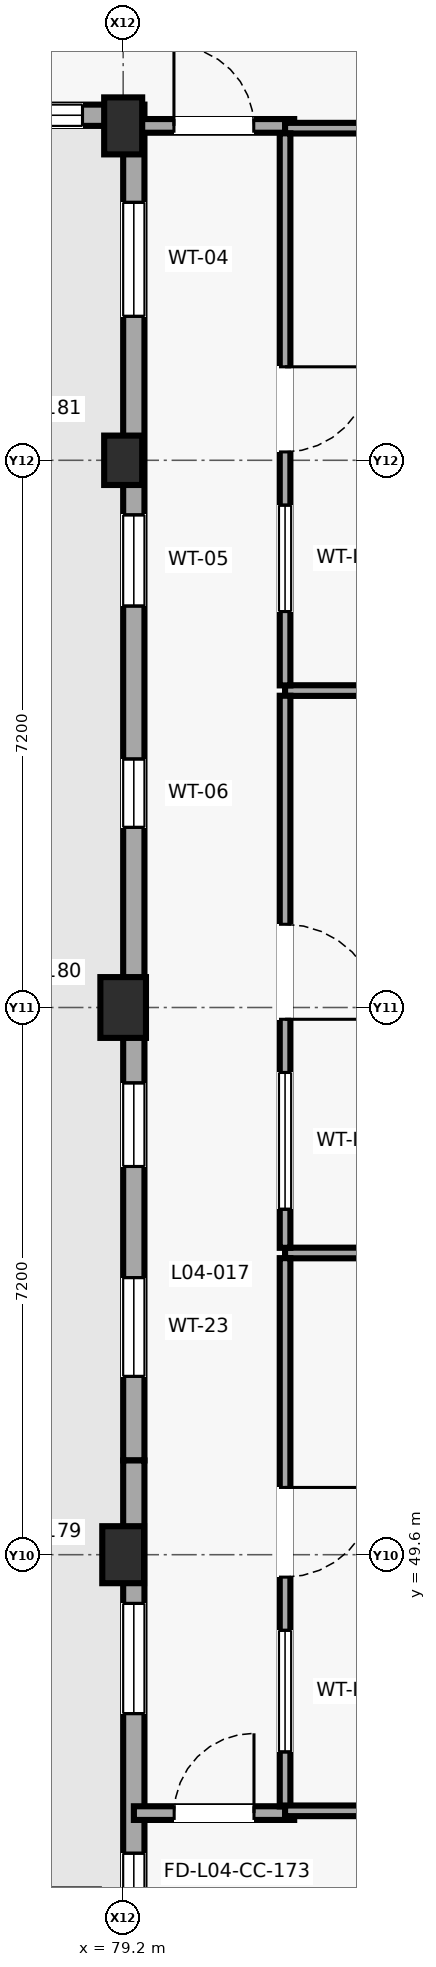
"""IFC4 building model, lengths in metres.
Left out: names, types, materials, properties, quantities, classifications, styles, units other than length and angle.
Written with IfcOpenShell. Run it as: python <this file> out.ifc"""

import sys

from ifc_helpers import new_model, si_unit, direction, frame, frame_2d, origin, origin_2d, place, context, subcontext, project, spatial, rectangle, extrude, element, fill, save


model = new_model("IFC4")
c1 = context("Model", 3, precision=1e-05, world=origin(), true_north=direction((0.0, 1.0)))
c2 = subcontext(c1, "Body", "Model", "MODEL_VIEW")
j1 = project(units=[si_unit("LENGTHUNIT", "METRE"), si_unit("PLANEANGLEUNIT", "RADIAN")], contexts=[c1])
p1 = place(None, origin())
s1 = spatial("IfcSite", under=j1, at=p1, CompositionType="ELEMENT")
p2 = place(p1, origin())
s2 = spatial("IfcBuilding", under=s1, at=p2, CompositionType="ELEMENT")
p3 = place(p2, frame((0.0, 0.0, 16.2)))
s3 = spatial("IfcBuildingStorey", under=s2, at=p3, CompositionType="ELEMENT", Elevation=16.2)
p4 = place(p3, frame((79.2, 49.6, 0.0), z_axis=(0.0, 0.0, 1.0), x_axis=(1.0, 0.0, 0.0)))
e1 = element("IfcColumn", 1, at=p4, inside=s3, PredefinedType="COLUMN", context=c2, shape_type="SweptSolid", body=[
    extrude(rectangle(XDim=0.55, YDim=0.75, at=origin_2d()), origin(), (0.0, 0.0, 1.0), 4.0),
])
p5 = place(p3, frame((79.2, 56.8, 0.0), z_axis=(0.0, 0.0, 1.0), x_axis=(1.0, 0.0, 0.0)))
e2 = element("IfcColumn", 2, at=p5, inside=s3, PredefinedType="COLUMN", context=c2, shape_type="SweptSolid", body=[
    extrude(rectangle(XDim=0.6, YDim=0.8, at=origin_2d()), origin(), (0.0, 0.0, 1.0), 4.0),
])
p6 = place(p3, frame((79.2, 64.0, 0.0), z_axis=(0.0, 0.0, 1.0), x_axis=(1.0, 0.0, 0.0)))
e3 = element("IfcColumn", 3, at=p6, inside=s3, PredefinedType="COLUMN", context=c2, shape_type="SweptSolid", body=[
    extrude(rectangle(XDim=0.5, YDim=0.65, at=origin_2d()), origin(), (0.0, 0.0, 1.0), 4.0),
])
p7 = place(p3, frame((79.2, 68.4, 0.0), z_axis=(0.0, 0.0, 1.0), x_axis=(1.0, 0.0, 0.0)))
e4 = element("IfcColumn", 4, at=p7, inside=s3, PredefinedType="COLUMN", context=c2, shape_type="SweptSolid", body=[
    extrude(rectangle(XDim=0.5, YDim=0.75, at=origin_2d()), origin(), (0.0, 0.0, 1.0), 4.0),
])
p8 = place(p3, frame((67.387, 68.54, 0.0), z_axis=(0.0, 0.0, 1.0), x_axis=(1.0, 0.0, 0.0)))
e5 = element("IfcWall", 5, at=p8, inside=s3, PredefinedType="SOLIDWALL", context=c2, shape_type="SweptSolid", body=[
    extrude(rectangle(XDim=12.093, YDim=0.28, at=frame_2d((6.046, 0.0))), origin(), (0.0, 0.0, 1.0), 3.78),
])
p9 = place(p8, frame((1.116, 0.0, 0.85)))
e6 = element("IfcOpeningElement", 6, at=p9, cuts=e5, PredefinedType="OPENING", context=c2, shape_type="SweptSolid", body=[
    extrude(rectangle(XDim=1.8, YDim=1.8, at=frame_2d((0.9, 0.9))), frame((0.0, 0.15, 0.0), z_axis=(0.0, -1.0, 0.0), x_axis=(1.0, 0.0, 0.0)), (0.0, 0.0, 1.0), 0.3),
])
p10 = place(p8, frame((4.997, 0.0, 0.85)))
e7 = element("IfcOpeningElement", 7, at=p10, cuts=e5, PredefinedType="OPENING", context=c2, shape_type="SweptSolid", body=[
    extrude(rectangle(XDim=2.1, YDim=1.8, at=frame_2d((1.05, 0.9))), frame((0.0, 0.15, 0.0), z_axis=(0.0, -1.0, 0.0), x_axis=(1.0, 0.0, 0.0)), (0.0, 0.0, 1.0), 0.3),
])
p11 = place(p8, frame((8.878, 0.0, 0.85)))
e8 = element("IfcOpeningElement", 8, at=p11, cuts=e5, PredefinedType="OPENING", context=c2, shape_type="SweptSolid", body=[
    extrude(rectangle(XDim=2.4, YDim=1.85, at=frame_2d((1.2, 0.925))), frame((0.0, 0.15, 0.0), z_axis=(0.0, -1.0, 0.0), x_axis=(1.0, 0.0, 0.0)), (0.0, 0.0, 1.0), 0.3),
])
p12 = place(p3, frame((79.34, 68.4, 0.0), z_axis=(0.0, 0.0, 1.0), x_axis=(0.0, -1.0, 0.0)))
e9 = element("IfcWall", 9, at=p12, inside=s3, PredefinedType="SOLIDWALL", context=c2, shape_type="SweptSolid", body=[
    extrude(rectangle(XDim=17.56, YDim=0.28, at=frame_2d((8.78, 0.0))), origin(), (0.0, 0.0, 1.0), 3.175),
])
p13 = place(p12, frame((1.006, 0.0, 0.85)))
e10 = element("IfcOpeningElement", 10, at=p13, cuts=e9, PredefinedType="OPENING", context=c2, shape_type="SweptSolid", body=[
    extrude(rectangle(XDim=1.5, YDim=1.65, at=frame_2d((0.75, 0.825))), frame((0.0, 0.15, 0.0), z_axis=(0.0, -1.0, 0.0), x_axis=(1.0, 0.0, 0.0)), (0.0, 0.0, 1.0), 0.3),
])
p14 = place(p12, frame((5.118, 0.0, 0.85)))
e11 = element("IfcOpeningElement", 11, at=p14, cuts=e9, PredefinedType="OPENING", context=c2, shape_type="SweptSolid", body=[
    extrude(rectangle(XDim=1.2, YDim=1.65, at=frame_2d((0.6, 0.825))), frame((0.0, 0.15, 0.0), z_axis=(0.0, -1.0, 0.0), x_axis=(1.0, 0.0, 0.0)), (0.0, 0.0, 1.0), 0.3),
])
p15 = place(p12, frame((8.33, 0.0, 1.05)))
e12 = element("IfcOpeningElement", 12, at=p15, cuts=e9, PredefinedType="OPENING", context=c2, shape_type="SweptSolid", body=[
    extrude(rectangle(XDim=0.9, YDim=1.5, at=frame_2d((0.45, 0.75))), frame((0.0, 0.15, 0.0), z_axis=(0.0, -1.0, 0.0), x_axis=(1.0, 0.0, 0.0)), (0.0, 0.0, 1.0), 0.3),
])
p16 = place(p12, frame((12.592, 0.0, 0.75)))
e13 = element("IfcOpeningElement", 13, at=p16, cuts=e9, PredefinedType="OPENING", context=c2, shape_type="SweptSolid", body=[
    extrude(rectangle(XDim=1.1, YDim=2.1, at=frame_2d((0.55, 1.05))), frame((0.0, 0.15, 0.0), z_axis=(0.0, -1.0, 0.0), x_axis=(1.0, 0.0, 0.0)), (0.0, 0.0, 1.0), 0.3),
])
p17 = place(p12, frame((15.154, 0.0, 1.05)))
e14 = element("IfcOpeningElement", 14, at=p17, cuts=e9, PredefinedType="OPENING", context=c2, shape_type="SweptSolid", body=[
    extrude(rectangle(XDim=1.3, YDim=1.6, at=frame_2d((0.65, 0.8))), frame((0.0, 0.15, 0.0), z_axis=(0.0, -1.0, 0.0), x_axis=(1.0, 0.0, 0.0)), (0.0, 0.0, 1.0), 0.3),
])
p18 = place(p3, frame((79.34, 50.84, 0.0), z_axis=(0.0, 0.0, 1.0), x_axis=(0.0, -1.0, 0.0)))
e15 = element("IfcWall", 15, at=p18, inside=s3, PredefinedType="SOLIDWALL", context=c2, shape_type="SweptSolid", body=[
    extrude(rectangle(XDim=17.56, YDim=0.28, at=frame_2d((8.78, 0.0))), origin(), (0.0, 0.0, 1.0), 3.175),
])
p19 = place(p18, frame((6.79, 0.0, 0.0)))
e16 = element("IfcOpeningElement", 16, at=p19, cuts=e15, PredefinedType="OPENING", context=c2, shape_type="SweptSolid", body=[
    extrude(rectangle(XDim=1.1, YDim=2.15, at=frame_2d((0.55, 1.075))), frame((0.0, 0.15, 0.0), z_axis=(0.0, -1.0, 0.0), x_axis=(1.0, 0.0, 0.0)), (0.0, 0.0, 1.0), 0.3),
])
p20 = place(p18, frame((1.881, 0.0, 0.85)))
e17 = element("IfcOpeningElement", 17, at=p20, cuts=e15, PredefinedType="OPENING", context=c2, shape_type="SweptSolid", body=[
    extrude(rectangle(XDim=1.45, YDim=1.7, at=frame_2d((0.725, 0.85))), frame((0.0, 0.15, 0.0), z_axis=(0.0, -1.0, 0.0), x_axis=(1.0, 0.0, 0.0)), (0.0, 0.0, 1.0), 0.3),
])
p21 = place(p18, frame((5.168, 0.0, 0.75)))
e18 = element("IfcOpeningElement", 18, at=p21, cuts=e15, PredefinedType="OPENING", context=c2, shape_type="SweptSolid", body=[
    extrude(rectangle(XDim=1.1, YDim=2.1, at=frame_2d((0.55, 1.05))), frame((0.0, 0.15, 0.0), z_axis=(0.0, -1.0, 0.0), x_axis=(1.0, 0.0, 0.0)), (0.0, 0.0, 1.0), 0.3),
])
p22 = place(p3, frame((79.341, 46.2, 0.0), z_axis=(0.0, 0.0, 1.0), x_axis=(1.0, 0.0, 0.0)))
e19 = element("IfcWall", 19, at=p22, inside=s3, PredefinedType="PARTITIONING", context=c2, shape_type="SweptSolid", body=[
    extrude(rectangle(XDim=2.109, YDim=0.18, at=frame_2d((1.054, 0.0))), origin(), (0.0, 0.0, 1.0), 3.78),
])
p23 = place(p22, frame((0.53, 0.0, 0.0)))
e20 = element("IfcOpeningElement", 20, at=p23, cuts=e19, PredefinedType="OPENING", context=c2, shape_type="SweptSolid", body=[
    extrude(rectangle(XDim=1.05, YDim=2.15, at=frame_2d((0.525, 1.075))), frame((0.0, 0.1, 0.0), z_axis=(0.0, -1.0, 0.0), x_axis=(1.0, 0.0, 0.0)), (0.0, 0.0, 1.0), 0.2),
])
p24 = place(p3, frame((79.336, 68.4, 0.0), z_axis=(0.0, 0.0, 1.0), x_axis=(1.0, 0.0, 0.0)))
e21 = element("IfcWall", 21, at=p24, inside=s3, PredefinedType="PARTITIONING", context=c2, shape_type="SweptSolid", body=[
    extrude(rectangle(XDim=2.114, YDim=0.18, at=frame_2d((1.057, 0.0))), origin(), (0.0, 0.0, 1.0), 3.025),
])
p25 = place(p24, frame((0.532, 0.0, 0.0)))
e22 = element("IfcOpeningElement", 22, at=p25, cuts=e21, PredefinedType="OPENING", context=c2, shape_type="SweptSolid", body=[
    extrude(rectangle(XDim=1.05, YDim=2.15, at=frame_2d((0.525, 1.075))), frame((0.0, 0.1, 0.0), z_axis=(0.0, -1.0, 0.0), x_axis=(1.0, 0.0, 0.0)), (0.0, 0.0, 1.0), 0.2),
])
p26 = place(p3, frame((86.522, 53.57, 0.0), z_axis=(0.0, 0.0, 1.0), x_axis=(-1.0, 0.0, 0.0)))
e23 = element("IfcWall", 23, at=p26, inside=s3, PredefinedType="PARTITIONING", context=c2, shape_type="SweptSolid", body=[
    extrude(rectangle(XDim=5.192, YDim=0.14, at=frame_2d((2.596, 0.0))), origin(), (0.0, 0.0, 1.0), 3.775),
])
p27 = place(p3, frame((81.33, 53.502, 0.0), z_axis=(0.0, 0.0, 1.0), x_axis=(0.0, -1.0, 0.0)))
e24 = element("IfcWall", 24, at=p27, inside=s3, PredefinedType="PARTITIONING", context=c2, shape_type="SweptSolid", body=[
    extrude(rectangle(XDim=7.214, YDim=0.14, at=frame_2d((3.607, 0.0))), origin(), (0.0, 0.0, 1.0), 3.775),
])
p28 = place(p27, frame((3.017, 0.0, 0.0)))
e25 = element("IfcOpeningElement", 25, at=p28, cuts=e24, PredefinedType="OPENING", context=c2, shape_type="SweptSolid", body=[
    extrude(rectangle(XDim=1.18, YDim=2.2, at=frame_2d((0.59, 1.1))), frame((0.0, 0.08, 0.0), z_axis=(0.0, -1.0, 0.0), x_axis=(1.0, 0.0, 0.0)), (0.0, 0.0, 1.0), 0.16),
])
p29 = place(p27, frame((4.897, 0.0, 1.05)))
e26 = element("IfcOpeningElement", 26, at=p29, cuts=e24, PredefinedType="OPENING", context=c2, shape_type="SweptSolid", body=[
    extrude(rectangle(XDim=1.6, YDim=1.1, at=frame_2d((0.8, 0.55))), frame((0.0, 0.08, 0.0), z_axis=(0.0, -1.0, 0.0), x_axis=(1.0, 0.0, 0.0)), (0.0, 0.0, 1.0), 0.16),
])
for number, where, z_axis, x_axis in (
    (27, (81.33, 46.23, 0.0), (0.0, 0.0, 1.0), (1.0, 0.0, 0.0)),
    (28, (86.522, 60.97, 0.0), (0.0, 0.0, 1.0), (-1.0, 0.0, 0.0)),
):
    element("IfcWall", number, at=place(p3, frame(where, z_axis=z_axis, x_axis=x_axis)), inside=s3, PredefinedType="PARTITIONING", context=c2, shape_type="SweptSolid", body=[
        extrude(rectangle(XDim=5.192, YDim=0.14, at=frame_2d((2.596, 0.0))), origin(), (0.0, 0.0, 1.0), 3.775),
    ])
p30 = place(p3, frame((81.33, 60.902, 0.0), z_axis=(0.0, 0.0, 1.0), x_axis=(0.0, -1.0, 0.0)))
e29 = element("IfcWall", 29, at=p30, inside=s3, PredefinedType="PARTITIONING", context=c2, shape_type="SweptSolid", body=[
    extrude(rectangle(XDim=7.264, YDim=0.14, at=frame_2d((3.632, 0.0))), origin(), (0.0, 0.0, 1.0), 3.775),
])
p31 = place(p30, frame((3.007, 0.0, 0.0)))
e30 = element("IfcOpeningElement", 30, at=p31, cuts=e29, PredefinedType="OPENING", context=c2, shape_type="SweptSolid", body=[
    extrude(rectangle(XDim=1.25, YDim=2.22, at=frame_2d((0.625, 1.11))), frame((0.0, 0.08, 0.0), z_axis=(0.0, -1.0, 0.0), x_axis=(1.0, 0.0, 0.0)), (0.0, 0.0, 1.0), 0.16),
])
p32 = place(p30, frame((4.957, 0.0, 1.05)))
e31 = element("IfcOpeningElement", 31, at=p32, cuts=e29, PredefinedType="OPENING", context=c2, shape_type="SweptSolid", body=[
    extrude(rectangle(XDim=1.8, YDim=1.2, at=frame_2d((0.9, 0.6))), frame((0.0, 0.08, 0.0), z_axis=(0.0, -1.0, 0.0), x_axis=(1.0, 0.0, 0.0)), (0.0, 0.0, 1.0), 0.16),
])
p33 = place(p3, frame((86.522, 68.37, 0.0), z_axis=(0.0, 0.0, 1.0), x_axis=(-1.0, 0.0, 0.0)))
e32 = element("IfcWall", 32, at=p33, inside=s3, PredefinedType="PARTITIONING", context=c2, shape_type="SweptSolid", body=[
    extrude(rectangle(XDim=5.192, YDim=0.14, at=frame_2d((2.596, 0.0))), origin(), (0.0, 0.0, 1.0), 3.025),
])
p34 = place(p3, frame((81.33, 68.302, 0.0), z_axis=(0.0, 0.0, 1.0), x_axis=(0.0, -1.0, 0.0)))
e33 = element("IfcWall", 33, at=p34, inside=s3, PredefinedType="PARTITIONING", context=c2, shape_type="SweptSolid", body=[
    extrude(rectangle(XDim=7.264, YDim=0.14, at=frame_2d((3.632, 0.0))), origin(), (0.0, 0.0, 1.0), 3.775),
])
p35 = place(p34, frame((3.072, 0.0, 0.0)))
e34 = element("IfcOpeningElement", 34, at=p35, cuts=e33, PredefinedType="OPENING", context=c2, shape_type="SweptSolid", body=[
    extrude(rectangle(XDim=1.12, YDim=2.18, at=frame_2d((0.56, 1.09))), frame((0.0, 0.08, 0.0), z_axis=(0.0, -1.0, 0.0), x_axis=(1.0, 0.0, 0.0)), (0.0, 0.0, 1.0), 0.16),
])
p36 = place(p34, frame((4.892, 0.0, 1.05)))
e35 = element("IfcOpeningElement", 35, at=p36, cuts=e33, PredefinedType="OPENING", context=c2, shape_type="SweptSolid", body=[
    extrude(rectangle(XDim=1.4, YDim=1.05, at=frame_2d((0.7, 0.525))), frame((0.0, 0.08, 0.0), z_axis=(0.0, -1.0, 0.0), x_axis=(1.0, 0.0, 0.0)), (0.0, 0.0, 1.0), 0.16),
])
p37 = place(p11, origin())
e36 = element("IfcWindow", 36, at=p37, inside=s3, PartitioningType="SINGLE_PANEL", PredefinedType="WINDOW", context=c2, shape_type="SweptSolid", body=[
    extrude(rectangle(XDim=2.4, YDim=1.85, at=frame_2d((1.2, 0.925))), frame((0.0, 0.03, 0.0), z_axis=(0.0, -1.0, 0.0), x_axis=(1.0, 0.0, 0.0)), (0.0, 0.0, 1.0), 0.06),
])
fill(e8, e36)
p38 = place(p13, origin())
e37 = element("IfcWindow", 37, at=p38, inside=s3, PartitioningType="SINGLE_PANEL", PredefinedType="WINDOW", context=c2, shape_type="SweptSolid", body=[
    extrude(rectangle(XDim=1.5, YDim=1.65, at=frame_2d((0.75, 0.825))), frame((0.0, 0.03, 0.0), z_axis=(0.0, -1.0, 0.0), x_axis=(1.0, 0.0, 0.0)), (0.0, 0.0, 1.0), 0.06),
])
fill(e10, e37)
p39 = place(p14, origin())
e38 = element("IfcWindow", 38, at=p39, inside=s3, PartitioningType="SINGLE_PANEL", PredefinedType="WINDOW", context=c2, shape_type="SweptSolid", body=[
    extrude(rectangle(XDim=1.2, YDim=1.65, at=frame_2d((0.6, 0.825))), frame((0.0, 0.03, 0.0), z_axis=(0.0, -1.0, 0.0), x_axis=(1.0, 0.0, 0.0)), (0.0, 0.0, 1.0), 0.06),
])
fill(e11, e38)
p40 = place(p15, origin())
e39 = element("IfcWindow", 39, at=p40, inside=s3, PartitioningType="SINGLE_PANEL", PredefinedType="WINDOW", context=c2, shape_type="SweptSolid", body=[
    extrude(rectangle(XDim=0.9, YDim=1.5, at=frame_2d((0.45, 0.75))), frame((0.0, 0.03, 0.0), z_axis=(0.0, -1.0, 0.0), x_axis=(1.0, 0.0, 0.0)), (0.0, 0.0, 1.0), 0.06),
])
fill(e12, e39)
p41 = place(p16, origin())
e40 = element("IfcWindow", 40, at=p41, inside=s3, PartitioningType="SINGLE_PANEL", PredefinedType="WINDOW", context=c2, shape_type="SweptSolid", body=[
    extrude(rectangle(XDim=1.1, YDim=2.1, at=frame_2d((0.55, 1.05))), frame((0.0, 0.03, 0.0), z_axis=(0.0, -1.0, 0.0), x_axis=(1.0, 0.0, 0.0)), (0.0, 0.0, 1.0), 0.06),
])
fill(e13, e40)
p42 = place(p17, origin())
e41 = element("IfcWindow", 41, at=p42, inside=s3, PartitioningType="SINGLE_PANEL", PredefinedType="WINDOW", context=c2, shape_type="SweptSolid", body=[
    extrude(rectangle(XDim=1.3, YDim=1.6, at=frame_2d((0.65, 0.8))), frame((0.0, 0.03, 0.0), z_axis=(0.0, -1.0, 0.0), x_axis=(1.0, 0.0, 0.0)), (0.0, 0.0, 1.0), 0.06),
])
fill(e14, e41)
p43 = place(p20, origin())
e42 = element("IfcWindow", 42, at=p43, inside=s3, PartitioningType="SINGLE_PANEL", PredefinedType="WINDOW", context=c2, shape_type="SweptSolid", body=[
    extrude(rectangle(XDim=1.45, YDim=1.7, at=frame_2d((0.725, 0.85))), frame((0.0, 0.03, 0.0), z_axis=(0.0, -1.0, 0.0), x_axis=(1.0, 0.0, 0.0)), (0.0, 0.0, 1.0), 0.06),
])
fill(e17, e42)
p44 = place(p21, origin())
e43 = element("IfcWindow", 43, at=p44, inside=s3, PartitioningType="SINGLE_PANEL", PredefinedType="WINDOW", context=c2, shape_type="SweptSolid", body=[
    extrude(rectangle(XDim=1.1, YDim=2.1, at=frame_2d((0.55, 1.05))), frame((0.0, 0.03, 0.0), z_axis=(0.0, -1.0, 0.0), x_axis=(1.0, 0.0, 0.0)), (0.0, 0.0, 1.0), 0.06),
])
fill(e18, e43)
p45 = place(p23, origin())
e44 = element("IfcDoor", 44, at=p45, inside=s3, OperationType="SINGLE_SWING_RIGHT", PredefinedType="DOOR", context=c2, shape_type="SweptSolid", body=[
    extrude(rectangle(XDim=1.05, YDim=2.15, at=frame_2d((0.525, 1.075))), frame((0.0, 0.025, 0.0), z_axis=(0.0, -1.0, 0.0), x_axis=(1.0, 0.0, 0.0)), (0.0, 0.0, 1.0), 0.05),
])
fill(e20, e44)
p46 = place(p25, origin())
e45 = element("IfcDoor", 45, at=p46, inside=s3, OperationType="SINGLE_SWING_LEFT", PredefinedType="DOOR", context=c2, shape_type="SweptSolid", body=[
    extrude(rectangle(XDim=1.05, YDim=2.15, at=frame_2d((0.525, 1.075))), frame((0.0, 0.025, 0.0), z_axis=(0.0, -1.0, 0.0), x_axis=(1.0, 0.0, 0.0)), (0.0, 0.0, 1.0), 0.05),
])
fill(e22, e45)
p47 = place(p28, origin())
e46 = element("IfcDoor", 46, at=p47, inside=s3, OperationType="SINGLE_SWING_LEFT", PredefinedType="DOOR", context=c2, shape_type="SweptSolid", body=[
    extrude(rectangle(XDim=1.18, YDim=2.2, at=frame_2d((0.59, 1.1))), frame((0.0, 0.025, 0.0), z_axis=(0.0, -1.0, 0.0), x_axis=(1.0, 0.0, 0.0)), (0.0, 0.0, 1.0), 0.05),
])
fill(e25, e46)
p48 = place(p29, origin())
e47 = element("IfcWindow", 47, at=p48, inside=s3, PartitioningType="SINGLE_PANEL", PredefinedType="WINDOW", context=c2, shape_type="SweptSolid", body=[
    extrude(rectangle(XDim=1.6, YDim=1.1, at=frame_2d((0.8, 0.55))), frame((0.0, 0.03, 0.0), z_axis=(0.0, -1.0, 0.0), x_axis=(1.0, 0.0, 0.0)), (0.0, 0.0, 1.0), 0.06),
])
fill(e26, e47)
p49 = place(p31, origin())
e48 = element("IfcDoor", 48, at=p49, inside=s3, OperationType="SINGLE_SWING_RIGHT", PredefinedType="DOOR", context=c2, shape_type="SweptSolid", body=[
    extrude(rectangle(XDim=1.25, YDim=2.22, at=frame_2d((0.625, 1.11))), frame((0.0, 0.025, 0.0), z_axis=(0.0, -1.0, 0.0), x_axis=(1.0, 0.0, 0.0)), (0.0, 0.0, 1.0), 0.05),
])
fill(e30, e48)
p50 = place(p32, origin())
e49 = element("IfcWindow", 49, at=p50, inside=s3, PartitioningType="SINGLE_PANEL", PredefinedType="WINDOW", context=c2, shape_type="SweptSolid", body=[
    extrude(rectangle(XDim=1.8, YDim=1.2, at=frame_2d((0.9, 0.6))), frame((0.0, 0.03, 0.0), z_axis=(0.0, -1.0, 0.0), x_axis=(1.0, 0.0, 0.0)), (0.0, 0.0, 1.0), 0.06),
])
fill(e31, e49)
p51 = place(p35, origin())
e50 = element("IfcDoor", 50, at=p51, inside=s3, OperationType="SINGLE_SWING_LEFT", PredefinedType="DOOR", context=c2, shape_type="SweptSolid", body=[
    extrude(rectangle(XDim=1.12, YDim=2.18, at=frame_2d((0.56, 1.09))), frame((0.0, 0.025, 0.0), z_axis=(0.0, -1.0, 0.0), x_axis=(1.0, 0.0, 0.0)), (0.0, 0.0, 1.0), 0.05),
])
fill(e34, e50)
p52 = place(p36, origin())
e51 = element("IfcWindow", 51, at=p52, inside=s3, PartitioningType="SINGLE_PANEL", PredefinedType="WINDOW", context=c2, shape_type="SweptSolid", body=[
    extrude(rectangle(XDim=1.4, YDim=1.05, at=frame_2d((0.7, 0.525))), frame((0.0, 0.03, 0.0), z_axis=(0.0, -1.0, 0.0), x_axis=(1.0, 0.0, 0.0)), (0.0, 0.0, 1.0), 0.06),
])
fill(e35, e51)
save(model, sys.argv[1])
